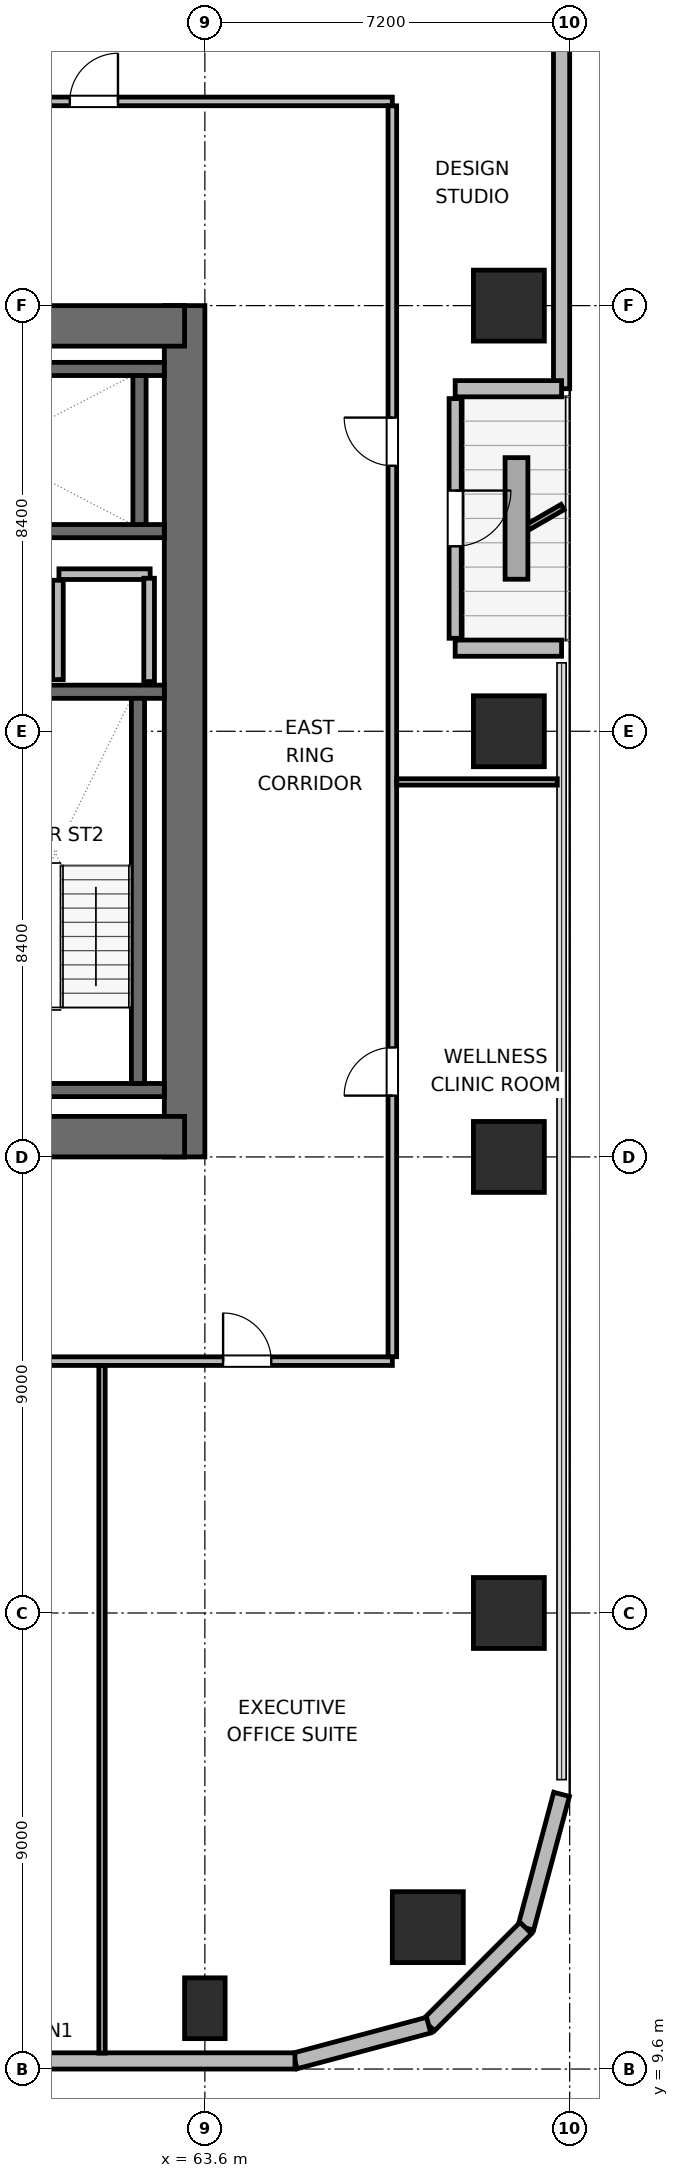
"""IFC4 building model, lengths in metres.
Left out: names, types, materials, properties, quantities, classifications, styles, units other than length and angle.
Written with IfcOpenShell. Run it as: python <this file> out.ifc"""

import sys

from ifc_helpers import new_model, si_unit, direction, frame, frame_2d, origin, origin_2d, place, context, subcontext, project, spatial, rectangle, circle, extrude, element, fill, save


model = new_model("IFC4")
c1 = context("Model", 3, precision=1e-05, world=origin(), true_north=direction((0.0, 1.0)))
c2 = subcontext(c1, "Body", "Model", "MODEL_VIEW")
j1 = project(units=[si_unit("LENGTHUNIT", "METRE"), si_unit("PLANEANGLEUNIT", "RADIAN")], contexts=[c1])
p1 = place(None, origin())
s1 = spatial("IfcSite", under=j1, at=p1, CompositionType="ELEMENT")
p2 = place(p1, origin())
s2 = spatial("IfcBuilding", under=s1, at=p2, CompositionType="ELEMENT")
p3 = place(p2, frame((0.0, 0.0, 109.2)))
s3 = spatial("IfcBuildingStorey", under=s2, at=p3, CompositionType="ELEMENT", Elevation=109.2)
p4 = place(p3, frame((63.2, 27.6, 0.0), z_axis=(0.0, 0.0, 1.0), x_axis=(0.0, 1.0, 0.0)))
e1 = element("IfcWall", 1, at=p4, inside=s3, PredefinedType="SHEAR", context=c2, shape_type="SweptSolid", body=[
    extrude(rectangle(XDim=16.8, YDim=0.8, at=frame_2d((8.4, 0.0))), origin(), (0.0, 0.0, 1.0), 3.9),
])
p5 = place(p3, frame((54.0, 28.0, 0.0), z_axis=(0.0, 0.0, 1.0), x_axis=(1.0, 0.0, 0.0)))
e2 = element("IfcWall", 2, at=p5, inside=s3, PredefinedType="SHEAR", context=c2, shape_type="SweptSolid", body=[
    extrude(rectangle(XDim=9.2, YDim=0.8, at=frame_2d((4.6, 0.0))), origin(), (0.0, 0.0, 1.0), 3.9),
])
p6 = place(p5, frame((3.925, 0.0, 0.0)))
e3 = element("IfcOpeningElement", 3, at=p6, cuts=e2, PredefinedType="OPENING", context=c2, shape_type="SweptSolid", body=[
    extrude(rectangle(XDim=1.05, YDim=2.04, at=frame_2d((0.525, 1.02))), frame((0.0, 0.41, 0.0), z_axis=(0.0, -1.0, 0.0), x_axis=(1.0, 0.0, 0.0)), (0.0, 0.0, 1.0), 0.82),
])
p7 = place(p3, frame((54.0, 44.0, 0.0), z_axis=(0.0, 0.0, 1.0), x_axis=(1.0, 0.0, 0.0)))
e4 = element("IfcWall", 4, at=p7, inside=s3, PredefinedType="SHEAR", context=c2, shape_type="SweptSolid", body=[
    extrude(rectangle(XDim=9.2, YDim=0.8, at=frame_2d((4.6, 0.0))), origin(), (0.0, 0.0, 1.0), 3.9),
])
for number, where, z_axis, x_axis in (
    (5, (58.89, 28.92, 0.0), (0.0, 0.0, 1.0), (1.0, 0.0, 0.0)),
    (6, (58.89, 36.78, 0.0), (0.0, 0.0, 1.0), (1.0, 0.0, 0.0)),
):
    element("IfcWall", number, at=place(p3, frame(where, z_axis=z_axis, x_axis=x_axis)), inside=s3, PredefinedType="SHEAR", context=c2, shape_type="SweptSolid", body=[
        extrude(rectangle(XDim=3.91, YDim=0.26, at=frame_2d((1.955, 0.0))), origin(), (0.0, 0.0, 1.0), 3.9),
    ])
p8 = place(p3, frame((62.28, 29.05, 0.0), z_axis=(0.0, 0.0, 1.0), x_axis=(0.0, 1.0, 0.0)))
e7 = element("IfcWall", 7, at=p8, inside=s3, PredefinedType="SHEAR", context=c2, shape_type="SweptSolid", body=[
    extrude(rectangle(XDim=7.6, YDim=0.26, at=frame_2d((3.8, 0.0))), origin(), (0.0, 0.0, 1.0), 3.9),
])
p9 = place(p3, frame((54.4, 39.95, 0.0), z_axis=(0.0, 0.0, 1.0), x_axis=(1.0, 0.0, 0.0)))
e8 = element("IfcWall", 8, at=p9, inside=s3, PredefinedType="SHEAR", context=c2, shape_type="SweptSolid", body=[
    extrude(rectangle(XDim=8.4, YDim=0.26, at=frame_2d((4.2, 0.0))), origin(), (0.0, 0.0, 1.0), 3.9),
])
p10 = place(p9, frame((0.8, 0.0, 0.0)))
e9 = element("IfcOpeningElement", 9, at=p10, cuts=e8, PredefinedType="OPENING", context=c2, shape_type="SweptSolid", body=[
    extrude(rectangle(XDim=1.0, YDim=2.04, at=frame_2d((0.5, 1.02))), frame((0.0, 0.14, 0.0), z_axis=(0.0, -1.0, 0.0), x_axis=(1.0, 0.0, 0.0)), (0.0, 0.0, 1.0), 0.28),
])
p11 = place(p3, frame((54.4, 43.15, 0.0), z_axis=(0.0, 0.0, 1.0), x_axis=(1.0, 0.0, 0.0)))
e10 = element("IfcWall", 10, at=p11, inside=s3, PredefinedType="SHEAR", context=c2, shape_type="SweptSolid", body=[
    extrude(rectangle(XDim=8.4, YDim=0.26, at=frame_2d((4.2, 0.0))), origin(), (0.0, 0.0, 1.0), 3.9),
])
p12 = place(p3, frame((62.31, 40.08, 0.0), z_axis=(0.0, 0.0, 1.0), x_axis=(0.0, 1.0, 0.0)))
e11 = element("IfcWall", 11, at=p12, inside=s3, PredefinedType="SHEAR", context=c2, shape_type="SweptSolid", body=[
    extrude(rectangle(XDim=2.94, YDim=0.26, at=frame_2d((1.47, 0.0))), origin(), (0.0, 0.0, 1.0), 3.9),
])
p13 = place(p3, frame((68.0, 12.4, 0.0), z_axis=(0.0, 0.0, 1.0), x_axis=(1.0, 0.0, 0.0)))
e12 = element("IfcColumn", 12, at=p13, inside=s3, PredefinedType="COLUMN", context=c2, shape_type="SweptSolid", body=[
    extrude(circle(Radius=0.7, at=origin_2d()), origin(), (0.0, 0.0, 1.0), 3.9),
])
p14 = place(p3, frame((63.6, 10.8, 0.0), z_axis=(0.0, 0.0, 1.0), x_axis=(1.0, 0.0, 0.0)))
e13 = element("IfcColumn", 13, at=p14, inside=s3, PredefinedType="COLUMN", context=c2, shape_type="SweptSolid", body=[
    extrude(rectangle(XDim=0.8, YDim=1.2, at=origin_2d()), origin(), (0.0, 0.0, 1.0), 3.9),
])
for number, where, z_axis, x_axis in (
    (14, (69.6, 18.6, 0.0), (0.0, 0.0, 1.0), (1.0, 0.0, 0.0)),
    (15, (69.6, 27.6, 0.0), (0.0, 0.0, 1.0), (1.0, 0.0, 0.0)),
    (16, (69.6, 36.0, 0.0), (0.0, 0.0, 1.0), (1.0, 0.0, 0.0)),
    (17, (69.6, 44.4, 0.0), (0.0, 0.0, 1.0), (1.0, 0.0, 0.0)),
):
    element("IfcColumn", number, at=place(p3, frame(where, z_axis=z_axis, x_axis=x_axis)), inside=s3, PredefinedType="COLUMN", context=c2, shape_type="SweptSolid", body=[
        extrude(rectangle(XDim=1.4, YDim=1.4, at=origin_2d()), origin(), (0.0, 0.0, 1.0), 3.9),
    ])
p15 = place(p3, frame((70.64, 56.979, 0.0), z_axis=(0.0, 0.0, 1.0), x_axis=(0.0, -1.0, 0.0)))
e18 = element("IfcWall", 18, at=p15, inside=s3, PredefinedType="SOLIDWALL", context=c2, shape_type="SweptSolid", body=[
    extrude(rectangle(XDim=14.219, YDim=0.32, at=frame_2d((7.109, 0.0))), origin(), (0.0, 0.0, 1.0), 3.64),
])
p16 = place(p3, frame((70.64, 42.76, 0.0), z_axis=(0.0, 0.0, 1.0), x_axis=(-1.0, 0.0, 0.0)))
e19 = element("IfcWall", 19, at=p16, inside=s3, PredefinedType="SOLIDWALL", context=c2, shape_type="SweptSolid", body=[
    extrude(rectangle(XDim=2.1, YDim=0.32, at=frame_2d((1.05, 0.0))), origin(), (0.0, 0.0, 1.0), 2.875),
])
p17 = place(p3, frame((68.54, 42.565, 0.0), z_axis=(0.0, 0.0, 1.0), x_axis=(0.0, -1.0, 0.0)))
e20 = element("IfcWall", 20, at=p17, inside=s3, PredefinedType="SOLIDWALL", context=c2, shape_type="SweptSolid", body=[
    extrude(rectangle(XDim=4.73, YDim=0.24, at=frame_2d((2.365, 0.0))), origin(), (0.0, 0.0, 1.0), 3.162),
])
p18 = place(p17, frame((1.815, 0.0, 0.0)))
e21 = element("IfcOpeningElement", 21, at=p18, cuts=e20, PredefinedType="OPENING", context=c2, shape_type="SweptSolid", body=[
    extrude(rectangle(XDim=1.1, YDim=2.04, at=frame_2d((0.55, 1.02))), frame((0.0, 0.13, 0.0), z_axis=(0.0, -1.0, 0.0), x_axis=(1.0, 0.0, 0.0)), (0.0, 0.0, 1.0), 0.26),
])
p19 = place(p3, frame((68.54, 37.64, 0.0), z_axis=(0.0, 0.0, 1.0), x_axis=(1.0, 0.0, 0.0)))
e22 = element("IfcWall", 22, at=p19, inside=s3, PredefinedType="SOLIDWALL", context=c2, shape_type="SweptSolid", body=[
    extrude(rectangle(XDim=2.1, YDim=0.32, at=frame_2d((1.05, 0.0))), origin(), (0.0, 0.0, 1.0), 2.875),
])
p20 = place(p3, frame((70.64, 15.021, 0.0), z_axis=(0.0, 0.0, 1.0), x_axis=(-0.258613949072, -0.965980758269, 0.0)))
e23 = element("IfcWall", 23, at=p20, inside=s3, PredefinedType="SOLIDWALL", context=c2, shape_type="SweptSolid", body=[
    extrude(rectangle(XDim=2.731, YDim=0.32, at=frame_2d((1.366, 0.0))), origin(), (0.0, 0.0, 1.0), 3.64),
])
p21 = place(p3, frame((69.934, 12.383, 0.0), z_axis=(0.0, 0.0, 1.0), x_axis=(-0.707151821269, -0.707061738235, 0.0)))
e24 = element("IfcWall", 24, at=p21, inside=s3, PredefinedType="SOLIDWALL", context=c2, shape_type="SweptSolid", body=[
    extrude(rectangle(XDim=2.71, YDim=0.32, at=frame_2d((1.355, 0.0))), origin(), (0.0, 0.0, 1.0), 3.64),
])
p22 = place(p3, frame((68.017, 10.467, 0.0), z_axis=(0.0, 0.0, 1.0), x_axis=(-0.965958423373, -0.25869736047, 0.0)))
e25 = element("IfcWall", 25, at=p22, inside=s3, PredefinedType="SOLIDWALL", context=c2, shape_type="SweptSolid", body=[
    extrude(rectangle(XDim=2.731, YDim=0.32, at=frame_2d((1.366, 0.0))), origin(), (0.0, 0.0, 1.0), 3.64),
])
p23 = place(p3, frame((65.379, 9.76, 0.0), z_axis=(0.0, 0.0, 1.0), x_axis=(-1.0, 0.0, 0.0)))
e26 = element("IfcWall", 26, at=p23, inside=s3, PredefinedType="SOLIDWALL", context=c2, shape_type="SweptSolid", body=[
    extrude(rectangle(XDim=10.734, YDim=0.32, at=frame_2d((5.367, 0.0))), origin(), (0.0, 0.0, 1.0), 3.64),
])
p24 = place(p23, frame((5.169, 0.0, 0.85)))
e27 = element("IfcOpeningElement", 27, at=p24, cuts=e26, PredefinedType="OPENING", context=c2, shape_type="SweptSolid", body=[
    extrude(rectangle(XDim=1.8, YDim=1.1, at=frame_2d((0.9, 0.55))), frame((0.0, 0.17, 0.0), z_axis=(0.0, -1.0, 0.0), x_axis=(1.0, 0.0, 0.0)), (0.0, 0.0, 1.0), 0.34),
])
p25 = place(p3, frame((60.72, 39.1, 0.0), z_axis=(0.0, 0.0, 1.0), x_axis=(1.0, 0.0, 0.0)))
e28 = element("IfcWall", 28, at=p25, inside=s3, PredefinedType="PARTITIONING", context=c2, shape_type="SweptSolid", body=[
    extrude(rectangle(XDim=1.8, YDim=0.21, at=frame_2d((0.9, 0.0))), origin(), (0.0, 0.0, 1.0), 3.64),
])
p26 = place(p3, frame((60.7, 37.02, 0.0), z_axis=(0.0, 0.0, 1.0), x_axis=(0.0, 1.0, 0.0)))
e29 = element("IfcWall", 29, at=p26, inside=s3, PredefinedType="PARTITIONING", context=c2, shape_type="SweptSolid", body=[
    extrude(rectangle(XDim=1.96, YDim=0.21, at=frame_2d((0.98, 0.0))), origin(), (0.0, 0.0, 1.0), 3.64),
])
p27 = place(p3, frame((62.5, 36.98, 0.0), z_axis=(0.0, 0.0, 1.0), x_axis=(0.0, 1.0, 0.0)))
e30 = element("IfcWall", 30, at=p27, inside=s3, PredefinedType="PARTITIONING", context=c2, shape_type="SweptSolid", body=[
    extrude(rectangle(XDim=2.04, YDim=0.21, at=frame_2d((1.02, 0.0))), origin(), (0.0, 0.0, 1.0), 3.64),
])
p28 = place(p3, frame((28.7, 23.57, 0.0), z_axis=(0.0, 0.0, 1.0), x_axis=(1.0, 0.0, 0.0)))
e31 = element("IfcWall", 31, at=p28, inside=s3, PredefinedType="PARTITIONING", context=c2, shape_type="SweptSolid", body=[
    extrude(rectangle(XDim=38.6, YDim=0.17, at=frame_2d((19.3, 0.0))), origin(), (0.0, 0.0, 1.0), 3.64),
])
p29 = place(p28, frame((2.385, 0.0, 0.0)))
e32 = element("IfcOpeningElement", 32, at=p29, cuts=e31, PredefinedType="OPENING", context=c2, shape_type="SweptSolid", body=[
    extrude(rectangle(XDim=0.95, YDim=2.04, at=frame_2d((0.475, 1.02))), frame((0.0, 0.095, 0.0), z_axis=(0.0, -1.0, 0.0), x_axis=(1.0, 0.0, 0.0)), (0.0, 0.0, 1.0), 0.19),
])
p30 = place(p28, frame((7.51, 0.0, 0.0)))
e33 = element("IfcOpeningElement", 33, at=p30, cuts=e31, PredefinedType="OPENING", context=c2, shape_type="SweptSolid", body=[
    extrude(rectangle(XDim=0.95, YDim=2.04, at=frame_2d((0.475, 1.02))), frame((0.0, 0.095, 0.0), z_axis=(0.0, -1.0, 0.0), x_axis=(1.0, 0.0, 0.0)), (0.0, 0.0, 1.0), 0.19),
])
p31 = place(p28, frame((12.035, 0.0, 0.0)))
e34 = element("IfcOpeningElement", 34, at=p31, cuts=e31, PredefinedType="OPENING", context=c2, shape_type="SweptSolid", body=[
    extrude(rectangle(XDim=0.95, YDim=2.04, at=frame_2d((0.475, 1.02))), frame((0.0, 0.095, 0.0), z_axis=(0.0, -1.0, 0.0), x_axis=(1.0, 0.0, 0.0)), (0.0, 0.0, 1.0), 0.19),
])
p32 = place(p28, frame((16.56, 0.0, 0.0)))
e35 = element("IfcOpeningElement", 35, at=p32, cuts=e31, PredefinedType="OPENING", context=c2, shape_type="SweptSolid", body=[
    extrude(rectangle(XDim=0.95, YDim=2.04, at=frame_2d((0.475, 1.02))), frame((0.0, 0.095, 0.0), z_axis=(0.0, -1.0, 0.0), x_axis=(1.0, 0.0, 0.0)), (0.0, 0.0, 1.0), 0.19),
])
p33 = place(p28, frame((21.085, 0.0, 0.0)))
e36 = element("IfcOpeningElement", 36, at=p33, cuts=e31, PredefinedType="OPENING", context=c2, shape_type="SweptSolid", body=[
    extrude(rectangle(XDim=0.95, YDim=2.04, at=frame_2d((0.475, 1.02))), frame((0.0, 0.095, 0.0), z_axis=(0.0, -1.0, 0.0), x_axis=(1.0, 0.0, 0.0)), (0.0, 0.0, 1.0), 0.19),
])
p34 = place(p28, frame((25.61, 0.0, 0.0)))
e37 = element("IfcOpeningElement", 37, at=p34, cuts=e31, PredefinedType="OPENING", context=c2, shape_type="SweptSolid", body=[
    extrude(rectangle(XDim=0.95, YDim=2.04, at=frame_2d((0.475, 1.02))), frame((0.0, 0.095, 0.0), z_axis=(0.0, -1.0, 0.0), x_axis=(1.0, 0.0, 0.0)), (0.0, 0.0, 1.0), 0.19),
])
p35 = place(p28, frame((30.135, 0.0, 0.0)))
e38 = element("IfcOpeningElement", 38, at=p35, cuts=e31, PredefinedType="OPENING", context=c2, shape_type="SweptSolid", body=[
    extrude(rectangle(XDim=0.95, YDim=2.04, at=frame_2d((0.475, 1.02))), frame((0.0, 0.095, 0.0), z_axis=(0.0, -1.0, 0.0), x_axis=(1.0, 0.0, 0.0)), (0.0, 0.0, 1.0), 0.19),
])
p36 = place(p28, frame((35.26, 0.0, 0.0)))
e39 = element("IfcOpeningElement", 39, at=p36, cuts=e31, PredefinedType="OPENING", context=c2, shape_type="SweptSolid", body=[
    extrude(rectangle(XDim=0.95, YDim=2.04, at=frame_2d((0.475, 1.02))), frame((0.0, 0.095, 0.0), z_axis=(0.0, -1.0, 0.0), x_axis=(1.0, 0.0, 0.0)), (0.0, 0.0, 1.0), 0.19),
])
p37 = place(p3, frame((28.7, 48.43, 0.0), z_axis=(0.0, 0.0, 1.0), x_axis=(1.0, 0.0, 0.0)))
e40 = element("IfcWall", 40, at=p37, inside=s3, PredefinedType="PARTITIONING", context=c2, shape_type="SweptSolid", body=[
    extrude(rectangle(XDim=38.6, YDim=0.17, at=frame_2d((19.3, 0.0))), origin(), (0.0, 0.0, 1.0), 3.64),
])
p38 = place(p37, frame((3.195, 0.0, 0.0)))
e41 = element("IfcOpeningElement", 41, at=p38, cuts=e40, PredefinedType="OPENING", context=c2, shape_type="SweptSolid", body=[
    extrude(rectangle(XDim=0.95, YDim=2.04, at=frame_2d((0.475, 1.02))), frame((0.0, 0.095, 0.0), z_axis=(0.0, -1.0, 0.0), x_axis=(1.0, 0.0, 0.0)), (0.0, 0.0, 1.0), 0.19),
])
p39 = place(p37, frame((16.605, 0.0, 0.0)))
e42 = element("IfcOpeningElement", 42, at=p39, cuts=e40, PredefinedType="OPENING", context=c2, shape_type="SweptSolid", body=[
    extrude(rectangle(XDim=0.95, YDim=2.04, at=frame_2d((0.475, 1.02))), frame((0.0, 0.095, 0.0), z_axis=(0.0, -1.0, 0.0), x_axis=(1.0, 0.0, 0.0)), (0.0, 0.0, 1.0), 0.19),
])
p40 = place(p37, frame((32.235, 0.0, 0.0)))
e43 = element("IfcOpeningElement", 43, at=p40, cuts=e40, PredefinedType="OPENING", context=c2, shape_type="SweptSolid", body=[
    extrude(rectangle(XDim=0.95, YDim=2.04, at=frame_2d((0.475, 1.02))), frame((0.0, 0.095, 0.0), z_axis=(0.0, -1.0, 0.0), x_axis=(1.0, 0.0, 0.0)), (0.0, 0.0, 1.0), 0.19),
])
p41 = place(p3, frame((67.3, 23.657, 0.0), z_axis=(0.0, 0.0, 1.0), x_axis=(0.0, 1.0, 0.0)))
e44 = element("IfcWall", 44, at=p41, inside=s3, PredefinedType="PARTITIONING", context=c2, shape_type="SweptSolid", body=[
    extrude(rectangle(XDim=24.686, YDim=0.17, at=frame_2d((12.343, 0.0))), origin(), (0.0, 0.0, 1.0), 3.64),
])
p42 = place(p41, frame((5.153, 0.0, 0.0)))
e45 = element("IfcOpeningElement", 45, at=p42, cuts=e44, PredefinedType="OPENING", context=c2, shape_type="SweptSolid", body=[
    extrude(rectangle(XDim=0.95, YDim=2.04, at=frame_2d((0.475, 1.02))), frame((0.0, 0.095, 0.0), z_axis=(0.0, -1.0, 0.0), x_axis=(1.0, 0.0, 0.0)), (0.0, 0.0, 1.0), 0.19),
])
p43 = place(p41, frame((17.583, 0.0, 0.0)))
e46 = element("IfcOpeningElement", 46, at=p43, cuts=e44, PredefinedType="OPENING", context=c2, shape_type="SweptSolid", body=[
    extrude(rectangle(XDim=0.95, YDim=2.04, at=frame_2d((0.475, 1.02))), frame((0.0, 0.095, 0.0), z_axis=(0.0, -1.0, 0.0), x_axis=(1.0, 0.0, 0.0)), (0.0, 0.0, 1.0), 0.19),
])
p44 = place(p3, frame((61.57, 9.915, 0.0), z_axis=(0.0, 0.0, 1.0), x_axis=(0.0, 1.0, 0.0)))
e47 = element("IfcWall", 47, at=p44, inside=s3, PredefinedType="PARTITIONING", context=c2, shape_type="SweptSolid", body=[
    extrude(rectangle(XDim=13.568, YDim=0.125, at=frame_2d((6.784, 0.0))), origin(), (0.0, 0.0, 1.0), 3.64),
])
p45 = place(p3, frame((67.387, 35.0, 0.0), z_axis=(0.0, 0.0, 1.0), x_axis=(1.0, 0.0, 0.0)))
e48 = element("IfcWall", 48, at=p45, inside=s3, PredefinedType="PARTITIONING", context=c2, shape_type="SweptSolid", body=[
    extrude(rectangle(XDim=3.168, YDim=0.125, at=frame_2d((1.584, 0.0))), origin(), (0.0, 0.0, 1.0), 3.64),
])
p46 = place(p18, origin())
e49 = element("IfcDoor", 49, at=p46, inside=s3, OperationType="SINGLE_SWING_LEFT", PredefinedType="DOOR", context=c2, shape_type="SweptSolid", body=[
    extrude(rectangle(XDim=1.1, YDim=2.04, at=frame_2d((0.55, 1.02))), frame((0.0, 0.025, 0.0), z_axis=(0.0, -1.0, 0.0), x_axis=(1.0, 0.0, 0.0)), (0.0, 0.0, 1.0), 0.05),
])
fill(e21, e49)
p47 = place(p36, origin())
e50 = element("IfcDoor", 50, at=p47, inside=s3, OperationType="SINGLE_SWING_LEFT", PredefinedType="DOOR", context=c2, shape_type="SweptSolid", body=[
    extrude(rectangle(XDim=0.95, YDim=2.04, at=frame_2d((0.475, 1.02))), frame((0.0, 0.025, 0.0), z_axis=(0.0, -1.0, 0.0), x_axis=(1.0, 0.0, 0.0)), (0.0, 0.0, 1.0), 0.05),
])
fill(e39, e50)
p48 = place(p40, origin())
e51 = element("IfcDoor", 51, at=p48, inside=s3, OperationType="SINGLE_SWING_RIGHT", PredefinedType="DOOR", context=c2, shape_type="SweptSolid", body=[
    extrude(rectangle(XDim=0.95, YDim=2.04, at=frame_2d((0.475, 1.02))), frame((0.0, 0.025, 0.0), z_axis=(0.0, -1.0, 0.0), x_axis=(1.0, 0.0, 0.0)), (0.0, 0.0, 1.0), 0.05),
])
fill(e43, e51)
p49 = place(p42, origin())
e52 = element("IfcDoor", 52, at=p49, inside=s3, OperationType="SINGLE_SWING_LEFT", PredefinedType="DOOR", context=c2, shape_type="SweptSolid", body=[
    extrude(rectangle(XDim=0.95, YDim=2.04, at=frame_2d((0.475, 1.02))), frame((0.0, 0.025, 0.0), z_axis=(0.0, -1.0, 0.0), x_axis=(1.0, 0.0, 0.0)), (0.0, 0.0, 1.0), 0.05),
])
fill(e45, e52)
p50 = place(p43, origin())
e53 = element("IfcDoor", 53, at=p50, inside=s3, OperationType="SINGLE_SWING_RIGHT", PredefinedType="DOOR", context=c2, shape_type="SweptSolid", body=[
    extrude(rectangle(XDim=0.95, YDim=2.04, at=frame_2d((0.475, 1.02))), frame((0.0, 0.025, 0.0), z_axis=(0.0, -1.0, 0.0), x_axis=(1.0, 0.0, 0.0)), (0.0, 0.0, 1.0), 0.05),
])
fill(e46, e53)
save(model, sys.argv[1])
